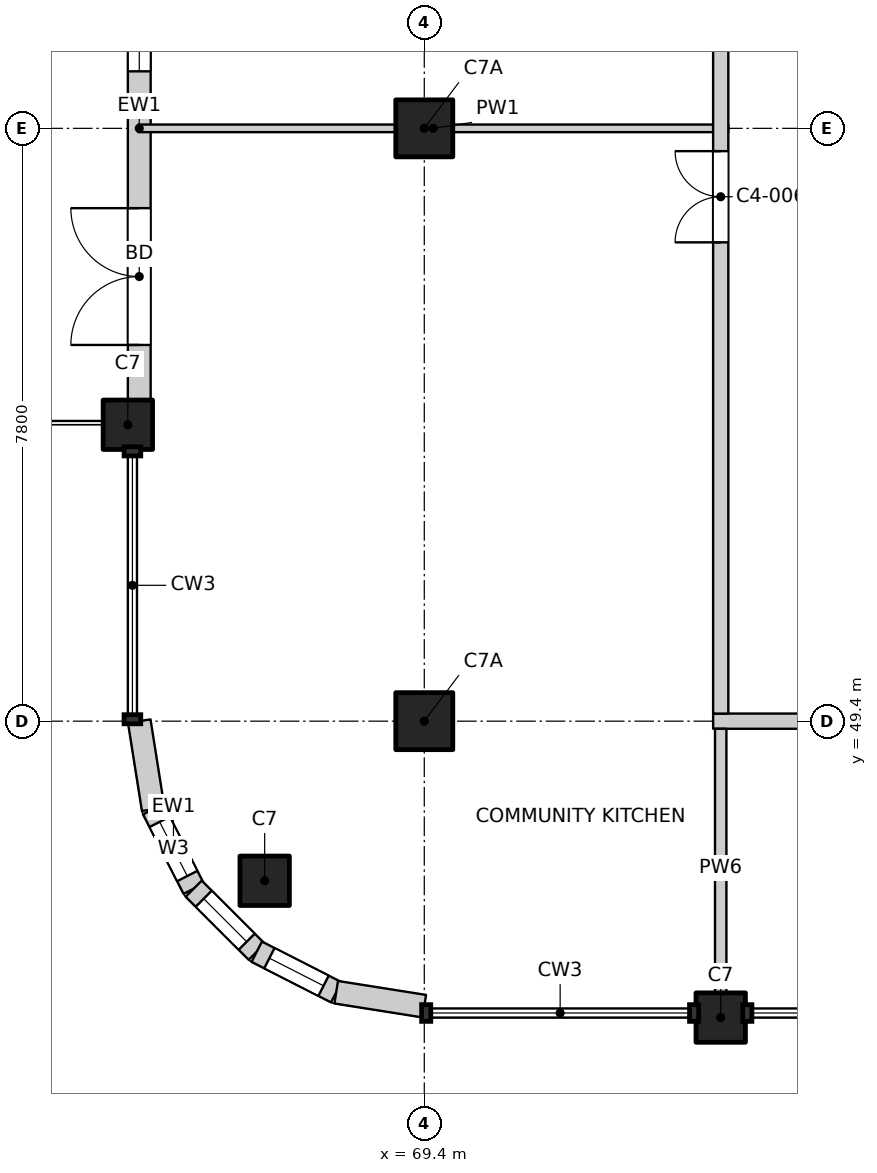
"""IFC4 building model, lengths in metres.
Left out: names, types, materials, properties, quantities, classifications, styles, units other than length and angle.
Written with IfcOpenShell. Run it as: python <this file> out.ifc"""

import sys

from ifc_helpers import new_model, si_unit, direction, frame, frame_2d, origin, origin_2d, place, context, subcontext, project, spatial, rectangle, extrude, element, fill, save


model = new_model("IFC4")
c1 = context("Model", 3, precision=1e-05, world=origin(), true_north=direction((0.0, 1.0)))
c2 = subcontext(c1, "Body", "Model", "MODEL_VIEW")
j1 = project(units=[si_unit("LENGTHUNIT", "METRE"), si_unit("PLANEANGLEUNIT", "RADIAN")], contexts=[c1])
p1 = place(None, origin())
s1 = spatial("IfcSite", under=j1, at=p1, CompositionType="ELEMENT")
p2 = place(p1, origin())
s2 = spatial("IfcBuilding", under=s1, at=p2, CompositionType="ELEMENT")
p3 = place(p2, frame((0.0, 0.0, 256.2)))
s3 = spatial("IfcBuildingStorey", under=s2, at=p3, CompositionType="ELEMENT", Elevation=256.2)
for number, where, z_axis, x_axis in (
    (1, (67.3, 47.3, -0.25), (0.0, 0.0, 1.0), (1.0, 0.0, 0.0)),
    (2, (65.5, 53.3, -0.25), (0.0, 0.0, 1.0), (1.0, 0.0, 0.0)),
    (3, (73.3, 45.5, -0.25), (0.0, 0.0, 1.0), (1.0, 0.0, 0.0)),
):
    element("IfcColumn", number, at=place(p3, frame(where, z_axis=z_axis, x_axis=x_axis)), inside=s3, PredefinedType="COLUMN", context=c2, shape_type="SweptSolid", body=[
        extrude(rectangle(XDim=0.65, YDim=0.65, at=origin_2d()), origin(), (0.0, 0.0, 1.0), 3.4),
    ])
for number, where, z_axis, x_axis in (
    (4, (69.4, 49.4, -0.25), (0.0, 0.0, 1.0), (1.0, 0.0, 0.0)),
    (5, (69.4, 57.2, -0.25), (0.0, 0.0, 1.0), (1.0, 0.0, 0.0)),
):
    element("IfcColumn", number, at=place(p3, frame(where, z_axis=z_axis, x_axis=x_axis)), inside=s3, PredefinedType="COLUMN", context=c2, shape_type="SweptSolid", body=[
        extrude(rectangle(XDim=0.75, YDim=0.75, at=origin_2d()), origin(), (0.0, 0.0, 1.0), 3.4),
    ])
p4 = place(p3, frame((65.65, 53.625, 0.0), z_axis=(0.0, 0.0, 1.0), x_axis=(0.0, 1.0, 0.0)))
e6 = element("IfcWall", 6, at=p4, inside=s3, PredefinedType="SOLIDWALL", context=c2, shape_type="SweptSolid", body=[
    extrude(rectangle(XDim=7.15, YDim=0.3, at=frame_2d((3.575, 0.0))), origin(), (0.0, 0.0, 1.0), 2.7),
])
p5 = place(p4, frame((0.725, 0.0, 0.0)))
e7 = element("IfcOpeningElement", 7, at=p5, cuts=e6, PredefinedType="OPENING", context=c2, shape_type="SweptSolid", body=[
    extrude(rectangle(XDim=1.8, YDim=2.4, at=frame_2d((0.9, 1.2))), frame((0.0, 0.16, 0.0), z_axis=(0.0, -1.0, 0.0), x_axis=(1.0, 0.0, 0.0)), (0.0, 0.0, 1.0), 0.32),
])
p6 = place(p4, frame((4.325, 0.0, 0.6)))
e8 = element("IfcOpeningElement", 8, at=p6, cuts=e6, PredefinedType="OPENING", context=c2, shape_type="SweptSolid", body=[
    extrude(rectangle(XDim=2.4, YDim=2.1, at=frame_2d((1.2, 1.05))), frame((0.0, 0.16, 0.0), z_axis=(0.0, -1.0, 0.0), x_axis=(1.0, 0.0, 0.0)), (0.0, 0.0, 1.0), 0.32),
])
p7 = place(p3, frame((65.65, 49.4, 0.0), z_axis=(0.0, 0.0, 1.0), x_axis=(0.156496880861, -0.987678452879, 0.0)))
e9 = element("IfcWall", 9, at=p7, inside=s3, PredefinedType="SOLIDWALL", context=c2, shape_type="SweptSolid", body=[
    extrude(rectangle(XDim=1.173, YDim=0.3, at=frame_2d((0.586, 0.0))), origin(), (0.0, 0.0, 1.0), 2.7),
])
p8 = place(p3, frame((65.833, 48.241, 0.0), z_axis=(0.0, 0.0, 1.0), x_axis=(0.454025524128, -0.890988677504, 0.0)))
e10 = element("IfcWall", 10, at=p8, inside=s3, PredefinedType="SOLIDWALL", context=c2, shape_type="SweptSolid", body=[
    extrude(rectangle(XDim=1.173, YDim=0.3, at=frame_2d((0.587, 0.0))), origin(), (0.0, 0.0, 1.0), 2.7),
])
p9 = place(p8, frame((0.187, 0.0, 0.9)))
e11 = element("IfcOpeningElement", 11, at=p9, cuts=e10, PredefinedType="OPENING", context=c2, shape_type="SweptSolid", body=[
    extrude(rectangle(XDim=0.8, YDim=1.2, at=frame_2d((0.4, 0.6))), frame((0.0, 0.16, 0.0), z_axis=(0.0, -1.0, 0.0), x_axis=(1.0, 0.0, 0.0)), (0.0, 0.0, 1.0), 0.32),
])
p10 = place(p3, frame((66.366, 47.196, 0.0), z_axis=(0.0, 0.0, 1.0), x_axis=(0.707106781187, -0.707106781187, 0.0)))
e12 = element("IfcWall", 12, at=p10, inside=s3, PredefinedType="SOLIDWALL", context=c2, shape_type="SweptSolid", body=[
    extrude(rectangle(XDim=1.173, YDim=0.3, at=frame_2d((0.586, 0.0))), origin(), (0.0, 0.0, 1.0), 2.7),
])
p11 = place(p10, frame((0.187, 0.0, 0.9)))
e13 = element("IfcOpeningElement", 13, at=p11, cuts=e12, PredefinedType="OPENING", context=c2, shape_type="SweptSolid", body=[
    extrude(rectangle(XDim=0.8, YDim=1.2, at=frame_2d((0.4, 0.6))), frame((0.0, 0.16, 0.0), z_axis=(0.0, -1.0, 0.0), x_axis=(1.0, 0.0, 0.0)), (0.0, 0.0, 1.0), 0.32),
])
p12 = place(p3, frame((67.196, 46.366, 0.0), z_axis=(0.0, 0.0, 1.0), x_axis=(0.890988677504, -0.454025524128, 0.0)))
e14 = element("IfcWall", 14, at=p12, inside=s3, PredefinedType="SOLIDWALL", context=c2, shape_type="SweptSolid", body=[
    extrude(rectangle(XDim=1.173, YDim=0.3, at=frame_2d((0.587, 0.0))), origin(), (0.0, 0.0, 1.0), 2.7),
])
p13 = place(p12, frame((0.187, 0.0, 0.9)))
e15 = element("IfcOpeningElement", 15, at=p13, cuts=e14, PredefinedType="OPENING", context=c2, shape_type="SweptSolid", body=[
    extrude(rectangle(XDim=0.8, YDim=1.2, at=frame_2d((0.4, 0.6))), frame((0.0, 0.16, 0.0), z_axis=(0.0, -1.0, 0.0), x_axis=(1.0, 0.0, 0.0)), (0.0, 0.0, 1.0), 0.32),
])
p14 = place(p3, frame((68.241, 45.833, 0.0), z_axis=(0.0, 0.0, 1.0), x_axis=(0.987678452879, -0.156496880861, 0.0)))
e16 = element("IfcWall", 16, at=p14, inside=s3, PredefinedType="SOLIDWALL", context=c2, shape_type="SweptSolid", body=[
    extrude(rectangle(XDim=1.173, YDim=0.3, at=frame_2d((0.586, 0.0))), origin(), (0.0, 0.0, 1.0), 2.7),
])
p15 = place(p3, frame((73.2, 49.4, 0.0), z_axis=(0.0, 0.0, 1.0), x_axis=(1.0, 0.0, 0.0)))
e17 = element("IfcWall", 17, at=p15, inside=s3, PredefinedType="PARTITIONING", context=c2, shape_type="SweptSolid", body=[
    extrude(rectangle(XDim=23.6, YDim=0.2, at=frame_2d((11.8, 0.0))), origin(), (0.0, 0.0, 1.0), 3.15),
])
p16 = place(p15, frame((5.35, 0.0, 0.0)))
e18 = element("IfcOpeningElement", 18, at=p16, cuts=e17, PredefinedType="OPENING", context=c2, shape_type="SweptSolid", body=[
    extrude(rectangle(XDim=1.2, YDim=2.1, at=frame_2d((0.6, 1.05))), frame((0.0, 0.11, 0.0), z_axis=(0.0, -1.0, 0.0), x_axis=(1.0, 0.0, 0.0)), (0.0, 0.0, 1.0), 0.22),
])
p17 = place(p15, frame((17.05, 0.0, 0.0)))
e19 = element("IfcOpeningElement", 19, at=p17, cuts=e17, PredefinedType="OPENING", context=c2, shape_type="SweptSolid", body=[
    extrude(rectangle(XDim=1.2, YDim=2.1, at=frame_2d((0.6, 1.05))), frame((0.0, 0.11, 0.0), z_axis=(0.0, -1.0, 0.0), x_axis=(1.0, 0.0, 0.0)), (0.0, 0.0, 1.0), 0.22),
])
p18 = place(p3, frame((65.635, 57.2, 0.0), z_axis=(0.0, 0.0, 1.0), x_axis=(1.0, 0.0, 0.0)))
e20 = element("IfcWall", 20, at=p18, inside=s3, PredefinedType="PARTITIONING", context=c2, shape_type="SweptSolid", body=[
    extrude(rectangle(XDim=7.765, YDim=0.1, at=frame_2d((3.883, 0.0))), origin(), (0.0, 0.0, 1.0), 3.15),
])
p19 = place(p3, frame((73.3, 45.635, 0.0), z_axis=(0.0, 0.0, 1.0), x_axis=(0.0, 1.0, 0.0)))
e21 = element("IfcWall", 21, at=p19, inside=s3, PredefinedType="PARTITIONING", context=c2, shape_type="SweptSolid", body=[
    extrude(rectangle(XDim=3.665, YDim=0.15, at=frame_2d((1.833, 0.0))), origin(), (0.0, 0.0, 1.0), 3.15),
])
p20 = place(p3, frame((73.3, 49.5, 0.0), z_axis=(0.0, 0.0, 1.0), x_axis=(0.0, 1.0, 0.0)))
e22 = element("IfcWall", 22, at=p20, inside=s3, PredefinedType="PARTITIONING", context=c2, shape_type="SweptSolid", body=[
    extrude(rectangle(XDim=34.865, YDim=0.2, at=frame_2d((17.433, 0.0))), origin(), (0.0, 0.0, 1.0), 3.15),
])
p21 = place(p20, frame((6.2, 0.0, 0.0)))
e23 = element("IfcOpeningElement", 23, at=p21, cuts=e22, PredefinedType="OPENING", context=c2, shape_type="SweptSolid", body=[
    extrude(rectangle(XDim=1.2, YDim=2.1, at=frame_2d((0.6, 1.05))), frame((0.0, 0.11, 0.0), z_axis=(0.0, -1.0, 0.0), x_axis=(1.0, 0.0, 0.0)), (0.0, 0.0, 1.0), 0.22),
])
p22 = place(p20, frame((9.05, 0.0, 0.0)))
e24 = element("IfcOpeningElement", 24, at=p22, cuts=e22, PredefinedType="OPENING", context=c2, shape_type="SweptSolid", body=[
    extrude(rectangle(XDim=1.2, YDim=2.1, at=frame_2d((0.6, 1.05))), frame((0.0, 0.11, 0.0), z_axis=(0.0, -1.0, 0.0), x_axis=(1.0, 0.0, 0.0)), (0.0, 0.0, 1.0), 0.22),
])
p23 = place(p20, frame((18.7, 0.0, 0.0)))
e25 = element("IfcOpeningElement", 25, at=p23, cuts=e22, PredefinedType="OPENING", context=c2, shape_type="SweptSolid", body=[
    extrude(rectangle(XDim=1.2, YDim=2.1, at=frame_2d((0.6, 1.05))), frame((0.0, 0.11, 0.0), z_axis=(0.0, -1.0, 0.0), x_axis=(1.0, 0.0, 0.0)), (0.0, 0.0, 1.0), 0.22),
])
p24 = place(p20, frame((28.55, 0.0, 0.0)))
e26 = element("IfcOpeningElement", 26, at=p24, cuts=e22, PredefinedType="OPENING", context=c2, shape_type="SweptSolid", body=[
    extrude(rectangle(XDim=1.2, YDim=2.1, at=frame_2d((0.6, 1.05))), frame((0.0, 0.11, 0.0), z_axis=(0.0, -1.0, 0.0), x_axis=(1.0, 0.0, 0.0)), (0.0, 0.0, 1.0), 0.22),
])
p25 = place(p20, frame((31.825, 0.0, 0.0)))
e27 = element("IfcOpeningElement", 27, at=p25, cuts=e22, PredefinedType="OPENING", context=c2, shape_type="SweptSolid", body=[
    extrude(rectangle(XDim=1.2, YDim=2.1, at=frame_2d((0.6, 1.05))), frame((0.0, 0.11, 0.0), z_axis=(0.0, -1.0, 0.0), x_axis=(1.0, 0.0, 0.0)), (0.0, 0.0, 1.0), 0.22),
])
p26 = place(p20, frame((33.65, 0.0, 0.0)))
e28 = element("IfcOpeningElement", 28, at=p26, cuts=e22, PredefinedType="OPENING", context=c2, shape_type="SweptSolid", body=[
    extrude(rectangle(XDim=0.9, YDim=2.1, at=frame_2d((0.45, 1.05))), frame((0.0, 0.11, 0.0), z_axis=(0.0, -1.0, 0.0), x_axis=(1.0, 0.0, 0.0)), (0.0, 0.0, 1.0), 0.22),
])
p27 = place(p5, origin())
e29 = element("IfcDoor", 29, at=p27, inside=s3, OperationType="DOUBLE_DOOR_SINGLE_SWING", PredefinedType="DOOR", context=c2, shape_type="SweptSolid", body=[
    extrude(rectangle(XDim=1.8, YDim=2.4, at=frame_2d((0.9, 1.2))), frame((0.0, 0.025, 0.0), z_axis=(0.0, -1.0, 0.0), x_axis=(1.0, 0.0, 0.0)), (0.0, 0.0, 1.0), 0.05),
])
fill(e7, e29)
p28 = place(p6, origin())
e30 = element("IfcWindow", 30, at=p28, inside=s3, PartitioningType="SINGLE_PANEL", PredefinedType="WINDOW", context=c2, shape_type="SweptSolid", body=[
    extrude(rectangle(XDim=2.4, YDim=2.1, at=frame_2d((1.2, 1.05))), frame((0.0, 0.03, 0.0), z_axis=(0.0, -1.0, 0.0), x_axis=(1.0, 0.0, 0.0)), (0.0, 0.0, 1.0), 0.06),
])
fill(e8, e30)
p29 = place(p9, origin())
e31 = element("IfcWindow", 31, at=p29, inside=s3, PartitioningType="SINGLE_PANEL", PredefinedType="WINDOW", context=c2, shape_type="SweptSolid", body=[
    extrude(rectangle(XDim=0.8, YDim=1.2, at=frame_2d((0.4, 0.6))), frame((0.0, 0.03, 0.0), z_axis=(0.0, -1.0, 0.0), x_axis=(1.0, 0.0, 0.0)), (0.0, 0.0, 1.0), 0.06),
])
fill(e11, e31)
p30 = place(p11, origin())
e32 = element("IfcWindow", 32, at=p30, inside=s3, PartitioningType="SINGLE_PANEL", PredefinedType="WINDOW", context=c2, shape_type="SweptSolid", body=[
    extrude(rectangle(XDim=0.8, YDim=1.2, at=frame_2d((0.4, 0.6))), frame((0.0, 0.03, 0.0), z_axis=(0.0, -1.0, 0.0), x_axis=(1.0, 0.0, 0.0)), (0.0, 0.0, 1.0), 0.06),
])
fill(e13, e32)
p31 = place(p13, origin())
e33 = element("IfcWindow", 33, at=p31, inside=s3, PartitioningType="SINGLE_PANEL", PredefinedType="WINDOW", context=c2, shape_type="SweptSolid", body=[
    extrude(rectangle(XDim=0.8, YDim=1.2, at=frame_2d((0.4, 0.6))), frame((0.0, 0.03, 0.0), z_axis=(0.0, -1.0, 0.0), x_axis=(1.0, 0.0, 0.0)), (0.0, 0.0, 1.0), 0.06),
])
fill(e15, e33)
p32 = place(p21, origin())
e34 = element("IfcDoor", 34, at=p32, inside=s3, OperationType="DOUBLE_DOOR_SINGLE_SWING", PredefinedType="DOOR", context=c2, shape_type="SweptSolid", body=[
    extrude(rectangle(XDim=1.2, YDim=2.1, at=frame_2d((0.6, 1.05))), frame((0.0, 0.025, 0.0), z_axis=(0.0, -1.0, 0.0), x_axis=(1.0, 0.0, 0.0)), (0.0, 0.0, 1.0), 0.05),
])
fill(e23, e34)
save(model, sys.argv[1])
